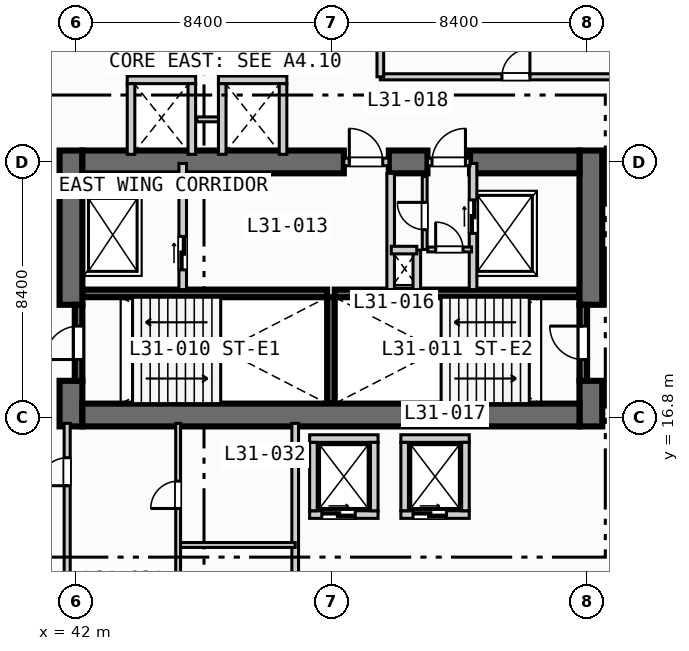
"""IFC4 building model, lengths in metres.
Left out: names, types, materials, properties, quantities, classifications, styles, units other than length and angle.
Written with IfcOpenShell. Run it as: python <this file> out.ifc"""

import sys

from ifc_helpers import new_model, si_unit, direction, frame, frame_2d, origin, place, context, subcontext, project, spatial, rectangle, extrude, element, fill, save


model = new_model("IFC4")
c1 = context("Model", 3, precision=1e-05, world=origin(), true_north=direction((0.0, 1.0)))
c2 = subcontext(c1, "Body", "Model", "MODEL_VIEW")
j1 = project(units=[si_unit("LENGTHUNIT", "METRE"), si_unit("PLANEANGLEUNIT", "RADIAN")], contexts=[c1])
p1 = place(None, origin())
s1 = spatial("IfcSite", under=j1, at=p1, CompositionType="ELEMENT")
p2 = place(p1, origin())
s2 = spatial("IfcBuilding", under=s1, at=p2, CompositionType="ELEMENT")
p3 = place(p2, frame((0.0, 0.0, 130.4)))
s3 = spatial("IfcBuildingStorey", under=s2, at=p3, CompositionType="ELEMENT", Elevation=130.4)
for number, where, z_axis, x_axis in (
    (1, (42.2, 20.875, 0.0), (0.0, 0.0, 1.0), (1.0, 0.0, 0.0)),
    (2, (50.5, 20.875, 0.0), (0.0, 0.0, 1.0), (1.0, 0.0, 0.0)),
):
    element("IfcWall", number, at=place(p3, frame(where, z_axis=z_axis, x_axis=x_axis)), inside=s3, PredefinedType="SOLIDWALL", context=c2, shape_type="SweptSolid", body=[
        extrude(rectangle(XDim=8.05, YDim=0.25, at=frame_2d((4.025, 0.0))), origin(), (0.0, 0.0, 1.0), 3.55),
    ])
p4 = place(p3, frame((50.375, 17.25, 0.0), z_axis=(0.0, 0.0, 1.0), x_axis=(0.0, 1.0, 0.0)))
e3 = element("IfcWall", 3, at=p4, inside=s3, PredefinedType="SOLIDWALL", context=c2, shape_type="SweptSolid", body=[
    extrude(rectangle(XDim=3.5, YDim=0.25, at=frame_2d((1.75, 0.0))), origin(), (0.0, 0.0, 1.0), 3.55),
])
p5 = place(p3, frame((41.825, 16.5, 0.0), z_axis=(0.0, 0.0, 1.0), x_axis=(0.0, 1.0, 0.0)))
e4 = element("IfcWall", 4, at=p5, inside=s3, PredefinedType="SHEAR", context=c2, shape_type="SweptSolid", body=[
    extrude(rectangle(XDim=1.5, YDim=0.75, at=frame_2d((0.75, 0.0))), origin(), (0.0, 0.0, 1.0), 3.55),
])
p6 = place(p3, frame((41.825, 20.5, 0.0), z_axis=(0.0, 0.0, 1.0), x_axis=(0.0, 1.0, 0.0)))
e5 = element("IfcWall", 5, at=p6, inside=s3, PredefinedType="SHEAR", context=c2, shape_type="SweptSolid", body=[
    extrude(rectangle(XDim=5.075, YDim=0.75, at=frame_2d((2.538, 0.0))), origin(), (0.0, 0.0, 1.0), 3.55),
])
p7 = place(p3, frame((58.925, 16.5, 0.0), z_axis=(0.0, 0.0, 1.0), x_axis=(0.0, 1.0, 0.0)))
e6 = element("IfcWall", 6, at=p7, inside=s3, PredefinedType="SHEAR", context=c2, shape_type="SweptSolid", body=[
    extrude(rectangle(XDim=1.5, YDim=0.75, at=frame_2d((0.75, 0.0))), origin(), (0.0, 0.0, 1.0), 3.55),
])
p8 = place(p3, frame((58.925, 20.5, 0.0), z_axis=(0.0, 0.0, 1.0), x_axis=(0.0, 1.0, 0.0)))
e7 = element("IfcWall", 7, at=p8, inside=s3, PredefinedType="SHEAR", context=c2, shape_type="SweptSolid", body=[
    extrude(rectangle(XDim=5.075, YDim=0.75, at=frame_2d((2.538, 0.0))), origin(), (0.0, 0.0, 1.0), 3.55),
])
p9 = place(p3, frame((42.2, 16.875, 0.0), z_axis=(0.0, 0.0, 1.0), x_axis=(1.0, 0.0, 0.0)))
e8 = element("IfcWall", 8, at=p9, inside=s3, PredefinedType="SHEAR", context=c2, shape_type="SweptSolid", body=[
    extrude(rectangle(XDim=16.35, YDim=0.75, at=frame_2d((8.175, 0.0))), origin(), (0.0, 0.0, 1.0), 3.55),
])
p10 = place(p3, frame((42.2, 25.2, 0.0), z_axis=(0.0, 0.0, 1.0), x_axis=(1.0, 0.0, 0.0)))
e9 = element("IfcWall", 9, at=p10, inside=s3, PredefinedType="SHEAR", context=c2, shape_type="SweptSolid", body=[
    extrude(rectangle(XDim=8.6, YDim=0.75, at=frame_2d((4.3, 0.0))), origin(), (0.0, 0.0, 1.0), 3.55),
])
p11 = place(p3, frame((52.28, 25.2, 0.0), z_axis=(0.0, 0.0, 1.0), x_axis=(1.0, 0.0, 0.0)))
e10 = element("IfcWall", 10, at=p11, inside=s3, PredefinedType="SHEAR", context=c2, shape_type="SweptSolid", body=[
    extrude(rectangle(XDim=1.27, YDim=0.75, at=frame_2d((0.635, 0.0))), origin(), (0.0, 0.0, 1.0), 3.55),
])
p12 = place(p3, frame((54.95, 25.2, 0.0), z_axis=(0.0, 0.0, 1.0), x_axis=(1.0, 0.0, 0.0)))
e11 = element("IfcWall", 11, at=p12, inside=s3, PredefinedType="SHEAR", context=c2, shape_type="SweptSolid", body=[
    extrude(rectangle(XDim=3.6, YDim=0.75, at=frame_2d((1.8, 0.0))), origin(), (0.0, 0.0, 1.0), 3.55),
])
p13 = place(p3, frame((42.075, 18.0, 0.0), z_axis=(0.0, 0.0, 1.0), x_axis=(0.0, 1.0, 0.0)))
e12 = element("IfcWall", 12, at=p13, inside=s3, PredefinedType="SOLIDWALL", context=c2, shape_type="SweptSolid", body=[
    extrude(rectangle(XDim=2.5, YDim=0.25, at=frame_2d((1.25, 0.0))), origin(), (0.0, 0.0, 1.0), 3.55),
])
p14 = place(p13, frame((0.7, 0.0, 0.0)))
e13 = element("IfcOpeningElement", 13, at=p14, cuts=e12, PredefinedType="OPENING", context=c2, shape_type="SweptSolid", body=[
    extrude(rectangle(XDim=1.1, YDim=2.15, at=frame_2d((0.55, 1.075))), frame((0.0, 0.135, 0.0), z_axis=(0.0, -1.0, 0.0), x_axis=(1.0, 0.0, 0.0)), (0.0, 0.0, 1.0), 0.27),
])
p15 = place(p3, frame((58.675, 18.0, 0.0), z_axis=(0.0, 0.0, 1.0), x_axis=(0.0, 1.0, 0.0)))
e14 = element("IfcWall", 14, at=p15, inside=s3, PredefinedType="SOLIDWALL", context=c2, shape_type="SweptSolid", body=[
    extrude(rectangle(XDim=2.5, YDim=0.25, at=frame_2d((1.25, 0.0))), origin(), (0.0, 0.0, 1.0), 3.55),
])
p16 = place(p15, frame((0.7, 0.0, 0.0)))
e15 = element("IfcOpeningElement", 15, at=p16, cuts=e14, PredefinedType="OPENING", context=c2, shape_type="SweptSolid", body=[
    extrude(rectangle(XDim=1.1, YDim=2.15, at=frame_2d((0.55, 1.075))), frame((0.0, 0.135, 0.0), z_axis=(0.0, -1.0, 0.0), x_axis=(1.0, 0.0, 0.0)), (0.0, 0.0, 1.0), 0.27),
])
p17 = place(p3, frame((45.5, 21.0, 0.0), z_axis=(0.0, 0.0, 1.0), x_axis=(0.0, 1.0, 0.0)))
e16 = element("IfcWall", 16, at=p17, inside=s3, PredefinedType="SOLIDWALL", context=c2, shape_type="SweptSolid", body=[
    extrude(rectangle(XDim=4.15, YDim=0.25, at=frame_2d((2.075, 0.0))), origin(), (0.0, 0.0, 1.0), 3.55),
])
p18 = place(p17, frame((0.65, 0.0, 0.0)))
e17 = element("IfcOpeningElement", 17, at=p18, cuts=e16, PredefinedType="OPENING", context=c2, shape_type="SweptSolid", body=[
    extrude(rectangle(XDim=1.1, YDim=2.15, at=frame_2d((0.55, 1.075))), frame((0.0, 0.135, 0.0), z_axis=(0.0, -1.0, 0.0), x_axis=(1.0, 0.0, 0.0)), (0.0, 0.0, 1.0), 0.27),
])
p19 = place(p3, frame((50.8, 25.2, 0.0), z_axis=(0.0, 0.0, 1.0), x_axis=(1.0, 0.0, 0.0)))
e18 = element("IfcWall", 18, at=p19, inside=s3, PredefinedType="SOLIDWALL", context=c2, shape_type="SweptSolid", body=[
    extrude(rectangle(XDim=1.48, YDim=0.25, at=frame_2d((0.74, 0.0))), origin(), (0.0, 0.0, 1.0), 3.55),
])
p20 = place(p19, frame((0.18, 0.0, 0.0)))
e19 = element("IfcOpeningElement", 19, at=p20, cuts=e18, PredefinedType="OPENING", context=c2, shape_type="SweptSolid", body=[
    extrude(rectangle(XDim=1.1, YDim=2.15, at=frame_2d((0.55, 1.075))), frame((0.0, 0.135, 0.0), z_axis=(0.0, -1.0, 0.0), x_axis=(1.0, 0.0, 0.0)), (0.0, 0.0, 1.0), 0.27),
])
p21 = place(p3, frame((52.34, 21.0, 0.0), z_axis=(0.0, 0.0, 1.0), x_axis=(0.0, 1.0, 0.0)))
e20 = element("IfcWall", 20, at=p21, inside=s3, PredefinedType="SOLIDWALL", context=c2, shape_type="SweptSolid", body=[
    extrude(rectangle(XDim=3.825, YDim=0.25, at=frame_2d((1.913, 0.0))), origin(), (0.0, 0.0, 1.0), 3.55),
])
p22 = place(p3, frame((55.05, 21.0, 0.0), z_axis=(0.0, 0.0, 1.0), x_axis=(0.0, 1.0, 0.0)))
e21 = element("IfcWall", 21, at=p22, inside=s3, PredefinedType="SOLIDWALL", context=c2, shape_type="SweptSolid", body=[
    extrude(rectangle(XDim=4.15, YDim=0.25, at=frame_2d((2.075, 0.0))), origin(), (0.0, 0.0, 1.0), 3.55),
])
p23 = place(p22, frame((1.85, 0.0, 0.0)))
e22 = element("IfcOpeningElement", 22, at=p23, cuts=e21, PredefinedType="OPENING", context=c2, shape_type="SweptSolid", body=[
    extrude(rectangle(XDim=1.1, YDim=2.15, at=frame_2d((0.55, 1.075))), frame((0.0, 0.135, 0.0), z_axis=(0.0, -1.0, 0.0), x_axis=(1.0, 0.0, 0.0)), (0.0, 0.0, 1.0), 0.27),
])
p24 = place(p3, frame((53.55, 25.2, 0.0), z_axis=(0.0, 0.0, 1.0), x_axis=(1.0, 0.0, 0.0)))
e23 = element("IfcWall", 23, at=p24, inside=s3, PredefinedType="SOLIDWALL", context=c2, shape_type="SweptSolid", body=[
    extrude(rectangle(XDim=1.4, YDim=0.25, at=frame_2d((0.7, 0.0))), origin(), (0.0, 0.0, 1.0), 3.55),
])
p25 = place(p24, frame((0.15, 0.0, 0.0)))
e24 = element("IfcOpeningElement", 24, at=p25, cuts=e23, PredefinedType="OPENING", context=c2, shape_type="SweptSolid", body=[
    extrude(rectangle(XDim=1.1, YDim=2.15, at=frame_2d((0.55, 1.075))), frame((0.0, 0.135, 0.0), z_axis=(0.0, -1.0, 0.0), x_axis=(1.0, 0.0, 0.0)), (0.0, 0.0, 1.0), 0.27),
])
p26 = place(p3, frame((53.2, 21.0, 0.0), z_axis=(0.0, 0.0, 1.0), x_axis=(0.0, 1.0, 0.0)))
e25 = element("IfcWall", 25, at=p26, inside=s3, PredefinedType="SOLIDWALL", context=c2, shape_type="SweptSolid", body=[
    extrude(rectangle(XDim=1.3, YDim=0.25, at=frame_2d((0.65, 0.0))), origin(), (0.0, 0.0, 1.0), 3.55),
])
p27 = place(p3, frame((52.36, 22.3, 0.0), z_axis=(0.0, 0.0, 1.0), x_axis=(1.0, 0.0, 0.0)))
e26 = element("IfcWall", 26, at=p27, inside=s3, PredefinedType="SOLIDWALL", context=c2, shape_type="SweptSolid", body=[
    extrude(rectangle(XDim=0.84, YDim=0.25, at=frame_2d((0.42, 0.0))), origin(), (0.0, 0.0, 1.0), 3.55),
])
p28 = place(p3, frame((53.56, 22.32, 0.0), z_axis=(0.0, 0.0, 1.0), x_axis=(1.0, 0.0, 0.0)))
e27 = element("IfcWall", 27, at=p28, inside=s3, PredefinedType="PARTITIONING", context=c2, shape_type="SweptSolid", body=[
    extrude(rectangle(XDim=1.44, YDim=0.16, at=frame_2d((0.72, 0.0))), origin(), (0.0, 0.0, 1.0), 3.55),
])
p29 = place(p28, frame((0.26, 0.0, 0.0)))
e28 = element("IfcOpeningElement", 28, at=p29, cuts=e27, PredefinedType="OPENING", context=c2, shape_type="SweptSolid", body=[
    extrude(rectangle(XDim=0.9, YDim=2.1, at=frame_2d((0.45, 1.05))), frame((0.0, 0.09, 0.0), z_axis=(0.0, -1.0, 0.0), x_axis=(1.0, 0.0, 0.0)), (0.0, 0.0, 1.0), 0.18),
])
p30 = place(p3, frame((53.46, 22.32, 0.0), z_axis=(0.0, 0.0, 1.0), x_axis=(0.0, 1.0, 0.0)))
e29 = element("IfcWall", 29, at=p30, inside=s3, PredefinedType="PARTITIONING", context=c2, shape_type="SweptSolid", body=[
    extrude(rectangle(XDim=2.4, YDim=0.16, at=frame_2d((1.2, 0.0))), origin(), (0.0, 0.0, 1.0), 3.55),
])
p31 = place(p30, frame((0.65, 0.0, 0.0)))
e30 = element("IfcOpeningElement", 30, at=p31, cuts=e29, PredefinedType="OPENING", context=c2, shape_type="SweptSolid", body=[
    extrude(rectangle(XDim=0.9, YDim=2.1, at=frame_2d((0.45, 1.05))), frame((0.0, 0.09, 0.0), z_axis=(0.0, -1.0, 0.0), x_axis=(1.0, 0.0, 0.0)), (0.0, 0.0, 1.0), 0.18),
])
p32 = place(p3, frame((49.675, 13.6, 0.0), z_axis=(0.0, 0.0, 1.0), x_axis=(1.0, 0.0, 0.0)))
e31 = element("IfcWall", 31, at=p32, inside=s3, PredefinedType="SOLIDWALL", context=c2, shape_type="SweptSolid", body=[
    extrude(rectangle(XDim=2.25, YDim=0.25, at=frame_2d((1.125, 0.0))), origin(), (0.0, 0.0, 1.0), 3.55),
])
p33 = place(p32, frame((0.4, 0.0, 0.0)))
e32 = element("IfcOpeningElement", 32, at=p33, cuts=e31, PredefinedType="OPENING", context=c2, shape_type="SweptSolid", body=[
    extrude(rectangle(XDim=1.1, YDim=2.15, at=frame_2d((0.55, 1.075))), frame((0.0, 0.135, 0.0), z_axis=(0.0, -1.0, 0.0), x_axis=(1.0, 0.0, 0.0)), (0.0, 0.0, 1.0), 0.27),
])
for number, where, z_axis, x_axis in (
    (33, (49.675, 16.1, 0.0), (0.0, 0.0, 1.0), (1.0, 0.0, 0.0)),
    (34, (49.8, 13.725, 0.0), (0.0, 0.0, 1.0), (0.0, 1.0, 0.0)),
    (35, (51.8, 13.725, 0.0), (0.0, 0.0, 1.0), (0.0, 1.0, 0.0)),
):
    element("IfcWall", number, at=place(p3, frame(where, z_axis=z_axis, x_axis=x_axis)), inside=s3, PredefinedType="SOLIDWALL", context=c2, shape_type="SweptSolid", body=[
        extrude(rectangle(XDim=2.25, YDim=0.25, at=frame_2d((1.125, 0.0))), origin(), (0.0, 0.0, 1.0), 3.55),
    ])
p34 = place(p3, frame((52.675, 13.6, 0.0), z_axis=(0.0, 0.0, 1.0), x_axis=(1.0, 0.0, 0.0)))
e36 = element("IfcWall", 36, at=p34, inside=s3, PredefinedType="SOLIDWALL", context=c2, shape_type="SweptSolid", body=[
    extrude(rectangle(XDim=2.25, YDim=0.25, at=frame_2d((1.125, 0.0))), origin(), (0.0, 0.0, 1.0), 3.55),
])
p35 = place(p34, frame((0.4, 0.0, 0.0)))
e37 = element("IfcOpeningElement", 37, at=p35, cuts=e36, PredefinedType="OPENING", context=c2, shape_type="SweptSolid", body=[
    extrude(rectangle(XDim=1.1, YDim=2.15, at=frame_2d((0.55, 1.075))), frame((0.0, 0.135, 0.0), z_axis=(0.0, -1.0, 0.0), x_axis=(1.0, 0.0, 0.0)), (0.0, 0.0, 1.0), 0.27),
])
for number, where, z_axis, x_axis in (
    (38, (52.675, 16.1, 0.0), (0.0, 0.0, 1.0), (1.0, 0.0, 0.0)),
    (39, (52.8, 13.725, 0.0), (0.0, 0.0, 1.0), (0.0, 1.0, 0.0)),
    (40, (54.8, 13.725, 0.0), (0.0, 0.0, 1.0), (0.0, 1.0, 0.0)),
    (41, (43.675, 27.9, 0.0), (0.0, 0.0, 1.0), (1.0, 0.0, 0.0)),
):
    element("IfcWall", number, at=place(p3, frame(where, z_axis=z_axis, x_axis=x_axis)), inside=s3, PredefinedType="SOLIDWALL", context=c2, shape_type="SweptSolid", body=[
        extrude(rectangle(XDim=2.25, YDim=0.25, at=frame_2d((1.125, 0.0))), origin(), (0.0, 0.0, 1.0), 3.55),
    ])
for number, where, z_axis, x_axis in (
    (42, (43.8, 25.45, 0.0), (0.0, 0.0, 1.0), (0.0, 1.0, 0.0)),
    (43, (45.8, 25.45, 0.0), (0.0, 0.0, 1.0), (0.0, 1.0, 0.0)),
):
    element("IfcWall", number, at=place(p3, frame(where, z_axis=z_axis, x_axis=x_axis)), inside=s3, PredefinedType="SOLIDWALL", context=c2, shape_type="SweptSolid", body=[
        extrude(rectangle(XDim=2.325, YDim=0.25, at=frame_2d((1.163, 0.0))), origin(), (0.0, 0.0, 1.0), 3.55),
    ])
p36 = place(p3, frame((45.96, 26.6, 0.0), z_axis=(0.0, 0.0, 1.0), x_axis=(1.0, 0.0, 0.0)))
e44 = element("IfcWall", 44, at=p36, inside=s3, PredefinedType="PARTITIONING", context=c2, shape_type="SweptSolid", body=[
    extrude(rectangle(XDim=0.88, YDim=0.16, at=frame_2d((0.44, 0.0))), origin(), (0.0, 0.0, 1.0), 3.55),
])
p37 = place(p3, frame((46.675, 27.9, 0.0), z_axis=(0.0, 0.0, 1.0), x_axis=(1.0, 0.0, 0.0)))
e45 = element("IfcWall", 45, at=p37, inside=s3, PredefinedType="SOLIDWALL", context=c2, shape_type="SweptSolid", body=[
    extrude(rectangle(XDim=2.25, YDim=0.25, at=frame_2d((1.125, 0.0))), origin(), (0.0, 0.0, 1.0), 3.55),
])
for number, where, z_axis, x_axis in (
    (46, (46.8, 25.45, 0.0), (0.0, 0.0, 1.0), (0.0, 1.0, 0.0)),
    (47, (48.8, 25.45, 0.0), (0.0, 0.0, 1.0), (0.0, 1.0, 0.0)),
):
    element("IfcWall", number, at=place(p3, frame(where, z_axis=z_axis, x_axis=x_axis)), inside=s3, PredefinedType="SOLIDWALL", context=c2, shape_type="SweptSolid", body=[
        extrude(rectangle(XDim=2.325, YDim=0.25, at=frame_2d((1.163, 0.0))), origin(), (0.0, 0.0, 1.0), 3.55),
    ])
p38 = place(p3, frame((41.7, 0.35, 0.0), z_axis=(0.0, 0.0, 1.0), x_axis=(0.0, 1.0, 0.0)))
e48 = element("IfcWall", 48, at=p38, inside=s3, PredefinedType="PARTITIONING", context=c2, shape_type="SweptSolid", body=[
    extrude(rectangle(XDim=16.25, YDim=0.2, at=frame_2d((8.125, 0.0))), origin(), (0.0, 0.0, 1.0), 2.8),
])
p39 = place(p38, frame((4.0, 0.0, 0.0)))
e49 = element("IfcOpeningElement", 49, at=p39, cuts=e48, PredefinedType="OPENING", context=c2, shape_type="SweptSolid", body=[
    extrude(rectangle(XDim=0.92, YDim=2.1, at=frame_2d((0.46, 1.05))), frame((0.0, 0.11, 0.0), z_axis=(0.0, -1.0, 0.0), x_axis=(1.0, 0.0, 0.0)), (0.0, 0.0, 1.0), 0.22),
])
p40 = place(p38, frame((14.2, 0.0, 0.0)))
e50 = element("IfcOpeningElement", 50, at=p40, cuts=e48, PredefinedType="OPENING", context=c2, shape_type="SweptSolid", body=[
    extrude(rectangle(XDim=0.92, YDim=2.1, at=frame_2d((0.46, 1.05))), frame((0.0, 0.11, 0.0), z_axis=(0.0, -1.0, 0.0), x_axis=(1.0, 0.0, 0.0)), (0.0, 0.0, 1.0), 0.22),
])
p41 = place(p3, frame((49.2, 0.35, 0.0), z_axis=(0.0, 0.0, 1.0), x_axis=(0.0, 1.0, 0.0)))
e51 = element("IfcWall", 51, at=p41, inside=s3, PredefinedType="PARTITIONING", context=c2, shape_type="SweptSolid", body=[
    extrude(rectangle(XDim=16.25, YDim=0.22, at=frame_2d((8.125, 0.0))), origin(), (0.0, 0.0, 1.0), 3.55),
])
p42 = place(p3, frame((45.35, 12.6, 0.0), z_axis=(0.0, 0.0, 1.0), x_axis=(1.0, 0.0, 0.0)))
e52 = element("IfcWall", 52, at=p42, inside=s3, PredefinedType="PARTITIONING", context=c2, shape_type="SweptSolid", body=[
    extrude(rectangle(XDim=3.85, YDim=0.16, at=frame_2d((1.925, 0.0))), origin(), (0.0, 0.0, 1.0), 3.55),
])
p43 = place(p3, frame((45.35, 9.4, 0.0), z_axis=(0.0, 0.0, 1.0), x_axis=(0.0, 1.0, 0.0)))
e53 = element("IfcWall", 53, at=p43, inside=s3, PredefinedType="PARTITIONING", context=c2, shape_type="SweptSolid", body=[
    extrude(rectangle(XDim=7.2, YDim=0.16, at=frame_2d((3.6, 0.0))), origin(), (0.0, 0.0, 1.0), 3.55),
])
p44 = place(p43, frame((4.4, 0.0, 0.0)))
e54 = element("IfcOpeningElement", 54, at=p44, cuts=e53, PredefinedType="OPENING", context=c2, shape_type="SweptSolid", body=[
    extrude(rectangle(XDim=0.9, YDim=2.1, at=frame_2d((0.45, 1.05))), frame((0.0, 0.09, 0.0), z_axis=(0.0, -1.0, 0.0), x_axis=(1.0, 0.0, 0.0)), (0.0, 0.0, 1.0), 0.18),
])
p45 = place(p3, frame((52.0, 28.0, 0.0), z_axis=(0.0, 0.0, 1.0), x_axis=(1.0, 0.0, 0.0)))
e55 = element("IfcWall", 55, at=p45, inside=s3, PredefinedType="PARTITIONING", context=c2, shape_type="SweptSolid", body=[
    extrude(rectangle(XDim=23.25, YDim=0.2, at=frame_2d((11.625, 0.0))), origin(), (0.0, 0.0, 1.0), 3.55),
])
p46 = place(p45, frame((4.0, 0.0, 0.0)))
e56 = element("IfcOpeningElement", 56, at=p46, cuts=e55, PredefinedType="OPENING", context=c2, shape_type="SweptSolid", body=[
    extrude(rectangle(XDim=0.92, YDim=2.1, at=frame_2d((0.46, 1.05))), frame((0.0, 0.11, 0.0), z_axis=(0.0, -1.0, 0.0), x_axis=(1.0, 0.0, 0.0)), (0.0, 0.0, 1.0), 0.22),
])
p47 = place(p3, frame((52.0, 28.0, 0.0), z_axis=(0.0, 0.0, 1.0), x_axis=(0.0, 1.0, 0.0)))
e57 = element("IfcWall", 57, at=p47, inside=s3, PredefinedType="PARTITIONING", context=c2, shape_type="SweptSolid", body=[
    extrude(rectangle(XDim=5.3, YDim=0.22, at=frame_2d((2.65, 0.0))), origin(), (0.0, 0.0, 1.0), 3.55),
])
p48 = place(p14, origin())
e58 = element("IfcDoor", 58, at=p48, inside=s3, OperationType="SINGLE_SWING_LEFT", PredefinedType="DOOR", context=c2, shape_type="SweptSolid", body=[
    extrude(rectangle(XDim=1.1, YDim=2.15, at=frame_2d((0.55, 1.075))), frame((0.0, 0.025, 0.0), z_axis=(0.0, -1.0, 0.0), x_axis=(1.0, 0.0, 0.0)), (0.0, 0.0, 1.0), 0.05),
])
fill(e13, e58)
p49 = place(p16, origin())
e59 = element("IfcDoor", 59, at=p49, inside=s3, OperationType="SINGLE_SWING_RIGHT", PredefinedType="DOOR", context=c2, shape_type="SweptSolid", body=[
    extrude(rectangle(XDim=1.1, YDim=2.15, at=frame_2d((0.55, 1.075))), frame((0.0, 0.025, 0.0), z_axis=(0.0, -1.0, 0.0), x_axis=(1.0, 0.0, 0.0)), (0.0, 0.0, 1.0), 0.05),
])
fill(e15, e59)
p50 = place(p18, origin())
e60 = element("IfcDoor", 60, at=p50, inside=s3, OperationType="SLIDING_TO_LEFT", PredefinedType="DOOR", context=c2, shape_type="SweptSolid", body=[
    extrude(rectangle(XDim=1.1, YDim=2.15, at=frame_2d((0.55, 1.075))), frame((0.0, 0.025, 0.0), z_axis=(0.0, -1.0, 0.0), x_axis=(1.0, 0.0, 0.0)), (0.0, 0.0, 1.0), 0.05),
])
fill(e17, e60)
p51 = place(p20, origin())
e61 = element("IfcDoor", 61, at=p51, inside=s3, OperationType="SINGLE_SWING_LEFT", PredefinedType="DOOR", context=c2, shape_type="SweptSolid", body=[
    extrude(rectangle(XDim=1.1, YDim=2.15, at=frame_2d((0.55, 1.075))), frame((0.0, 0.025, 0.0), z_axis=(0.0, -1.0, 0.0), x_axis=(1.0, 0.0, 0.0)), (0.0, 0.0, 1.0), 0.05),
])
fill(e19, e61)
p52 = place(p23, origin())
e62 = element("IfcDoor", 62, at=p52, inside=s3, OperationType="SLIDING_TO_LEFT", PredefinedType="DOOR", context=c2, shape_type="SweptSolid", body=[
    extrude(rectangle(XDim=1.1, YDim=2.15, at=frame_2d((0.55, 1.075))), frame((0.0, 0.025, 0.0), z_axis=(0.0, -1.0, 0.0), x_axis=(1.0, 0.0, 0.0)), (0.0, 0.0, 1.0), 0.05),
])
fill(e22, e62)
p53 = place(p25, origin())
e63 = element("IfcDoor", 63, at=p53, inside=s3, OperationType="SINGLE_SWING_RIGHT", PredefinedType="DOOR", context=c2, shape_type="SweptSolid", body=[
    extrude(rectangle(XDim=1.1, YDim=2.15, at=frame_2d((0.55, 1.075))), frame((0.0, 0.025, 0.0), z_axis=(0.0, -1.0, 0.0), x_axis=(1.0, 0.0, 0.0)), (0.0, 0.0, 1.0), 0.05),
])
fill(e24, e63)
p54 = place(p29, origin())
e64 = element("IfcDoor", 64, at=p54, inside=s3, OperationType="SINGLE_SWING_LEFT", PredefinedType="DOOR", context=c2, shape_type="SweptSolid", body=[
    extrude(rectangle(XDim=0.9, YDim=2.1, at=frame_2d((0.45, 1.05))), frame((0.0, 0.025, 0.0), z_axis=(0.0, -1.0, 0.0), x_axis=(1.0, 0.0, 0.0)), (0.0, 0.0, 1.0), 0.05),
])
fill(e28, e64)
p55 = place(p31, origin())
e65 = element("IfcDoor", 65, at=p55, inside=s3, OperationType="SINGLE_SWING_RIGHT", PredefinedType="DOOR", context=c2, shape_type="SweptSolid", body=[
    extrude(rectangle(XDim=0.9, YDim=2.1, at=frame_2d((0.45, 1.05))), frame((0.0, 0.025, 0.0), z_axis=(0.0, -1.0, 0.0), x_axis=(1.0, 0.0, 0.0)), (0.0, 0.0, 1.0), 0.05),
])
fill(e30, e65)
p56 = place(p33, origin())
e66 = element("IfcDoor", 66, at=p56, inside=s3, OperationType="SLIDING_TO_LEFT", PredefinedType="DOOR", context=c2, shape_type="SweptSolid", body=[
    extrude(rectangle(XDim=1.1, YDim=2.15, at=frame_2d((0.55, 1.075))), frame((0.0, 0.025, 0.0), z_axis=(0.0, -1.0, 0.0), x_axis=(1.0, 0.0, 0.0)), (0.0, 0.0, 1.0), 0.05),
])
fill(e32, e66)
p57 = place(p35, origin())
e67 = element("IfcDoor", 67, at=p57, inside=s3, OperationType="SLIDING_TO_LEFT", PredefinedType="DOOR", context=c2, shape_type="SweptSolid", body=[
    extrude(rectangle(XDim=1.1, YDim=2.15, at=frame_2d((0.55, 1.075))), frame((0.0, 0.025, 0.0), z_axis=(0.0, -1.0, 0.0), x_axis=(1.0, 0.0, 0.0)), (0.0, 0.0, 1.0), 0.05),
])
fill(e37, e67)
p58 = place(p40, origin())
e68 = element("IfcDoor", 68, at=p58, inside=s3, OperationType="SINGLE_SWING_LEFT", PredefinedType="DOOR", context=c2, shape_type="SweptSolid", body=[
    extrude(rectangle(XDim=0.92, YDim=2.1, at=frame_2d((0.46, 1.05))), frame((0.0, 0.025, 0.0), z_axis=(0.0, -1.0, 0.0), x_axis=(1.0, 0.0, 0.0)), (0.0, 0.0, 1.0), 0.05),
])
fill(e50, e68)
p59 = place(p44, origin())
e69 = element("IfcDoor", 69, at=p59, inside=s3, OperationType="SINGLE_SWING_LEFT", PredefinedType="DOOR", context=c2, shape_type="SweptSolid", body=[
    extrude(rectangle(XDim=0.9, YDim=2.1, at=frame_2d((0.45, 1.05))), frame((0.0, 0.025, 0.0), z_axis=(0.0, -1.0, 0.0), x_axis=(1.0, 0.0, 0.0)), (0.0, 0.0, 1.0), 0.05),
])
fill(e54, e69)
p60 = place(p46, origin())
e70 = element("IfcDoor", 70, at=p60, inside=s3, OperationType="SINGLE_SWING_RIGHT", PredefinedType="DOOR", context=c2, shape_type="SweptSolid", body=[
    extrude(rectangle(XDim=0.92, YDim=2.1, at=frame_2d((0.46, 1.05))), frame((0.0, 0.025, 0.0), z_axis=(0.0, -1.0, 0.0), x_axis=(1.0, 0.0, 0.0)), (0.0, 0.0, 1.0), 0.05),
])
fill(e56, e70)
save(model, sys.argv[1])
